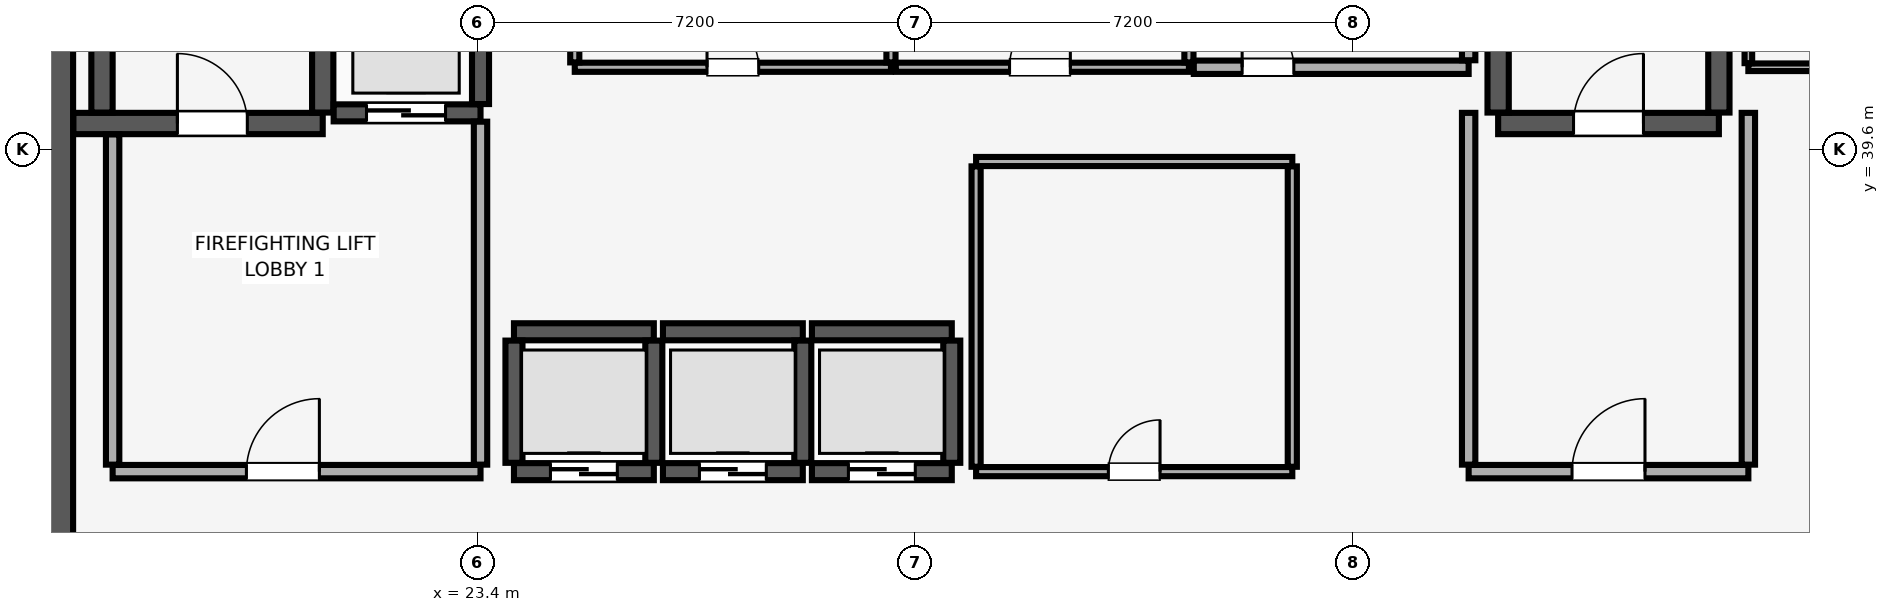
"""IFC4 building model, lengths in metres.
Left out: names, types, materials, properties, quantities, classifications, styles, units other than length and angle.
Written with IfcOpenShell. Run it as: python <this file> out.ifc"""

import sys

from ifc_helpers import new_model, si_unit, direction, frame, frame_2d, origin, place, context, subcontext, project, spatial, rectangle, extrude, element, fill, save


model = new_model("IFC4")
c1 = context("Model", 3, precision=1e-05, world=origin(), true_north=direction((0.0, 1.0)))
c2 = subcontext(c1, "Body", "Model", "MODEL_VIEW")
j1 = project(units=[si_unit("LENGTHUNIT", "METRE"), si_unit("PLANEANGLEUNIT", "RADIAN")], contexts=[c1])
p1 = place(None, origin())
s1 = spatial("IfcSite", under=j1, at=p1, CompositionType="ELEMENT")
p2 = place(p1, origin())
s2 = spatial("IfcBuilding", under=s1, at=p2, CompositionType="ELEMENT")
p3 = place(p2, frame((0.0, 0.0, 31.4)))
s3 = spatial("IfcBuildingStorey", under=s2, at=p3, CompositionType="ELEMENT", Elevation=31.4)
p4 = place(p3, frame((16.2, 29.4, 0.0), z_axis=(0.0, 0.0, 1.0), x_axis=(0.0, 1.0, 0.0)))
e1 = element("IfcWall", 1, at=p4, inside=s3, PredefinedType="SHEAR", context=c2, shape_type="SweptSolid", body=[
    extrude(rectangle(XDim=19.2, YDim=1.1, at=frame_2d((9.6, 0.0))), origin(), (0.0, 0.0, 1.0), 3.51),
])
p5 = place(p3, frame((16.755, 40.025, 0.0), z_axis=(0.0, 0.0, 1.0), x_axis=(1.0, 0.0, 0.0)))
e2 = element("IfcWall", 2, at=p5, inside=s3, PredefinedType="SHEAR", context=c2, shape_type="SweptSolid", body=[
    extrude(rectangle(XDim=4.1, YDim=0.35, at=frame_2d((2.05, 0.0))), origin(), (0.0, 0.0, 1.0), 3.51),
])
p6 = place(p5, frame((1.71, 0.0, 0.0)))
e3 = element("IfcOpeningElement", 3, at=p6, cuts=e2, PredefinedType="OPENING", context=c2, shape_type="SweptSolid", body=[
    extrude(rectangle(XDim=1.15, YDim=2.15, at=frame_2d((0.575, 1.075))), frame((0.0, 0.185, 0.0), z_axis=(0.0, -1.0, 0.0), x_axis=(1.0, 0.0, 0.0)), (0.0, 0.0, 1.0), 0.37),
])
for number, where, z_axis, x_axis in (
    (4, (17.225, 40.205, 0.0), (0.0, 0.0, 1.0), (0.0, 1.0, 0.0)),
    (5, (20.855, 40.205, 0.0), (0.0, 0.0, 1.0), (0.0, 1.0, 0.0)),
):
    element("IfcWall", number, at=place(p3, frame(where, z_axis=z_axis, x_axis=x_axis)), inside=s3, PredefinedType="SHEAR", context=c2, shape_type="SweptSolid", body=[
        extrude(rectangle(XDim=8.09, YDim=0.35, at=frame_2d((4.045, 0.0))), origin(), (0.0, 0.0, 1.0), 3.51),
    ])
p7 = place(p3, frame((40.185, 40.025, 0.0), z_axis=(0.0, 0.0, 1.0), x_axis=(1.0, 0.0, 0.0)))
e6 = element("IfcWall", 6, at=p7, inside=s3, PredefinedType="SHEAR", context=c2, shape_type="SweptSolid", body=[
    extrude(rectangle(XDim=3.63, YDim=0.35, at=frame_2d((1.815, 0.0))), origin(), (0.0, 0.0, 1.0), 3.51),
])
p8 = place(p7, frame((1.24, 0.0, 0.0)))
e7 = element("IfcOpeningElement", 7, at=p8, cuts=e6, PredefinedType="OPENING", context=c2, shape_type="SweptSolid", body=[
    extrude(rectangle(XDim=1.15, YDim=2.15, at=frame_2d((0.575, 1.075))), frame((0.0, 0.185, 0.0), z_axis=(0.0, -1.0, 0.0), x_axis=(1.0, 0.0, 0.0)), (0.0, 0.0, 1.0), 0.37),
])
for number, where, z_axis, x_axis in (
    (8, (40.185, 40.205, 0.0), (0.0, 0.0, 1.0), (0.0, 1.0, 0.0)),
    (9, (43.815, 40.205, 0.0), (0.0, 0.0, 1.0), (0.0, 1.0, 0.0)),
):
    element("IfcWall", number, at=place(p3, frame(where, z_axis=z_axis, x_axis=x_axis)), inside=s3, PredefinedType="SHEAR", context=c2, shape_type="SweptSolid", body=[
        extrude(rectangle(XDim=8.09, YDim=0.35, at=frame_2d((4.045, 0.0))), origin(), (0.0, 0.0, 1.0), 3.51),
    ])
p9 = place(p3, frame((24.0, 34.3, 0.0), z_axis=(0.0, 0.0, 1.0), x_axis=(1.0, 0.0, 0.0)))
e10 = element("IfcWall", 10, at=p9, inside=s3, PredefinedType="SHEAR", context=c2, shape_type="SweptSolid", body=[
    extrude(rectangle(XDim=2.3, YDim=0.28, at=frame_2d((1.15, 0.0))), origin(), (0.0, 0.0, 1.0), 3.51),
])
p10 = place(p9, frame((0.6, 0.0, 0.0)))
e11 = element("IfcOpeningElement", 11, at=p10, cuts=e10, PredefinedType="OPENING", context=c2, shape_type="SweptSolid", body=[
    extrude(rectangle(XDim=1.1, YDim=2.2, at=frame_2d((0.55, 1.1))), frame((0.0, 0.15, 0.0), z_axis=(0.0, -1.0, 0.0), x_axis=(1.0, 0.0, 0.0)), (0.0, 0.0, 1.0), 0.3),
])
p11 = place(p3, frame((24.0, 36.6, 0.0), z_axis=(0.0, 0.0, 1.0), x_axis=(1.0, 0.0, 0.0)))
e12 = element("IfcWall", 12, at=p11, inside=s3, PredefinedType="SHEAR", context=c2, shape_type="SweptSolid", body=[
    extrude(rectangle(XDim=2.3, YDim=0.28, at=frame_2d((1.15, 0.0))), origin(), (0.0, 0.0, 1.0), 3.51),
])
for number, where, z_axis, x_axis in (
    (13, (24.0, 34.445, 0.0), (0.0, 0.0, 1.0), (0.0, 1.0, 0.0)),
    (14, (26.3, 34.445, 0.0), (0.0, 0.0, 1.0), (0.0, 1.0, 0.0)),
):
    element("IfcWall", number, at=place(p3, frame(where, z_axis=z_axis, x_axis=x_axis)), inside=s3, PredefinedType="SHEAR", context=c2, shape_type="SweptSolid", body=[
        extrude(rectangle(XDim=2.01, YDim=0.28, at=frame_2d((1.005, 0.0))), origin(), (0.0, 0.0, 1.0), 3.51),
    ])
p12 = place(p3, frame((26.45, 34.3, 0.0), z_axis=(0.0, 0.0, 1.0), x_axis=(1.0, 0.0, 0.0)))
e15 = element("IfcWall", 15, at=p12, inside=s3, PredefinedType="SHEAR", context=c2, shape_type="SweptSolid", body=[
    extrude(rectangle(XDim=2.3, YDim=0.28, at=frame_2d((1.15, 0.0))), origin(), (0.0, 0.0, 1.0), 3.51),
])
p13 = place(p12, frame((0.6, 0.0, 0.0)))
e16 = element("IfcOpeningElement", 16, at=p13, cuts=e15, PredefinedType="OPENING", context=c2, shape_type="SweptSolid", body=[
    extrude(rectangle(XDim=1.1, YDim=2.2, at=frame_2d((0.55, 1.1))), frame((0.0, 0.15, 0.0), z_axis=(0.0, -1.0, 0.0), x_axis=(1.0, 0.0, 0.0)), (0.0, 0.0, 1.0), 0.3),
])
p14 = place(p3, frame((26.45, 36.6, 0.0), z_axis=(0.0, 0.0, 1.0), x_axis=(1.0, 0.0, 0.0)))
e17 = element("IfcWall", 17, at=p14, inside=s3, PredefinedType="SHEAR", context=c2, shape_type="SweptSolid", body=[
    extrude(rectangle(XDim=2.3, YDim=0.28, at=frame_2d((1.15, 0.0))), origin(), (0.0, 0.0, 1.0), 3.51),
])
p15 = place(p3, frame((28.75, 34.445, 0.0), z_axis=(0.0, 0.0, 1.0), x_axis=(0.0, 1.0, 0.0)))
e18 = element("IfcWall", 18, at=p15, inside=s3, PredefinedType="SHEAR", context=c2, shape_type="SweptSolid", body=[
    extrude(rectangle(XDim=2.01, YDim=0.28, at=frame_2d((1.005, 0.0))), origin(), (0.0, 0.0, 1.0), 3.51),
])
p16 = place(p3, frame((28.9, 34.3, 0.0), z_axis=(0.0, 0.0, 1.0), x_axis=(1.0, 0.0, 0.0)))
e19 = element("IfcWall", 19, at=p16, inside=s3, PredefinedType="SHEAR", context=c2, shape_type="SweptSolid", body=[
    extrude(rectangle(XDim=2.3, YDim=0.28, at=frame_2d((1.15, 0.0))), origin(), (0.0, 0.0, 1.0), 3.51),
])
p17 = place(p16, frame((0.6, 0.0, 0.0)))
e20 = element("IfcOpeningElement", 20, at=p17, cuts=e19, PredefinedType="OPENING", context=c2, shape_type="SweptSolid", body=[
    extrude(rectangle(XDim=1.1, YDim=2.2, at=frame_2d((0.55, 1.1))), frame((0.0, 0.15, 0.0), z_axis=(0.0, -1.0, 0.0), x_axis=(1.0, 0.0, 0.0)), (0.0, 0.0, 1.0), 0.3),
])
p18 = place(p3, frame((28.9, 36.6, 0.0), z_axis=(0.0, 0.0, 1.0), x_axis=(1.0, 0.0, 0.0)))
e21 = element("IfcWall", 21, at=p18, inside=s3, PredefinedType="SHEAR", context=c2, shape_type="SweptSolid", body=[
    extrude(rectangle(XDim=2.3, YDim=0.28, at=frame_2d((1.15, 0.0))), origin(), (0.0, 0.0, 1.0), 3.51),
])
p19 = place(p3, frame((31.2, 34.445, 0.0), z_axis=(0.0, 0.0, 1.0), x_axis=(0.0, 1.0, 0.0)))
e22 = element("IfcWall", 22, at=p19, inside=s3, PredefinedType="SHEAR", context=c2, shape_type="SweptSolid", body=[
    extrude(rectangle(XDim=2.01, YDim=0.28, at=frame_2d((1.005, 0.0))), origin(), (0.0, 0.0, 1.0), 3.51),
])
p20 = place(p3, frame((21.035, 40.2, 0.0), z_axis=(0.0, 0.0, 1.0), x_axis=(1.0, 0.0, 0.0)))
e23 = element("IfcWall", 23, at=p20, inside=s3, PredefinedType="SHEAR", context=c2, shape_type="SweptSolid", body=[
    extrude(rectangle(XDim=2.415, YDim=0.28, at=frame_2d((1.208, 0.0))), origin(), (0.0, 0.0, 1.0), 3.51),
])
p21 = place(p20, frame((0.54, 0.0, 0.0)))
e24 = element("IfcOpeningElement", 24, at=p21, cuts=e23, PredefinedType="OPENING", context=c2, shape_type="SweptSolid", body=[
    extrude(rectangle(XDim=1.3, YDim=2.3, at=frame_2d((0.65, 1.15))), frame((0.0, 0.15, 0.0), z_axis=(0.0, -1.0, 0.0), x_axis=(1.0, 0.0, 0.0)), (0.0, 0.0, 1.0), 0.3),
])
p22 = place(p3, frame((23.45, 40.345, 0.0), z_axis=(0.0, 0.0, 1.0), x_axis=(0.0, 1.0, 0.0)))
e25 = element("IfcWall", 25, at=p22, inside=s3, PredefinedType="SHEAR", context=c2, shape_type="SweptSolid", body=[
    extrude(rectangle(XDim=2.81, YDim=0.28, at=frame_2d((1.405, 0.0))), origin(), (0.0, 0.0, 1.0), 3.51),
])
p23 = place(p3, frame((17.4, 34.3, 0.0), z_axis=(0.0, 0.0, 1.0), x_axis=(1.0, 0.0, 0.0)))
e26 = element("IfcWall", 26, at=p23, inside=s3, PredefinedType="PARTITIONING", context=c2, shape_type="SweptSolid", body=[
    extrude(rectangle(XDim=6.05, YDim=0.22, at=frame_2d((3.025, 0.0))), origin(), (0.0, 0.0, 1.0), 3.51),
])
p24 = place(p23, frame((2.2, 0.0, 0.0)))
e27 = element("IfcOpeningElement", 27, at=p24, cuts=e26, PredefinedType="OPENING", context=c2, shape_type="SweptSolid", body=[
    extrude(rectangle(XDim=1.2, YDim=2.15, at=frame_2d((0.6, 1.075))), frame((0.0, 0.12, 0.0), z_axis=(0.0, -1.0, 0.0), x_axis=(1.0, 0.0, 0.0)), (0.0, 0.0, 1.0), 0.24),
])
p25 = place(p3, frame((17.4, 34.415, 0.0), z_axis=(0.0, 0.0, 1.0), x_axis=(0.0, 1.0, 0.0)))
e28 = element("IfcWall", 28, at=p25, inside=s3, PredefinedType="PARTITIONING", context=c2, shape_type="SweptSolid", body=[
    extrude(rectangle(XDim=5.43, YDim=0.22, at=frame_2d((2.715, 0.0))), origin(), (0.0, 0.0, 1.0), 3.51),
])
p26 = place(p3, frame((23.45, 34.415, 0.0), z_axis=(0.0, 0.0, 1.0), x_axis=(0.0, 1.0, 0.0)))
e29 = element("IfcWall", 29, at=p26, inside=s3, PredefinedType="PARTITIONING", context=c2, shape_type="SweptSolid", body=[
    extrude(rectangle(XDim=5.64, YDim=0.22, at=frame_2d((2.82, 0.0))), origin(), (0.0, 0.0, 1.0), 3.51),
])
p27 = place(p3, frame((39.7, 34.3, 0.0), z_axis=(0.0, 0.0, 1.0), x_axis=(1.0, 0.0, 0.0)))
e30 = element("IfcWall", 30, at=p27, inside=s3, PredefinedType="PARTITIONING", context=c2, shape_type="SweptSolid", body=[
    extrude(rectangle(XDim=4.6, YDim=0.22, at=frame_2d((2.3, 0.0))), origin(), (0.0, 0.0, 1.0), 3.51),
])
p28 = place(p27, frame((1.7, 0.0, 0.0)))
e31 = element("IfcOpeningElement", 31, at=p28, cuts=e30, PredefinedType="OPENING", context=c2, shape_type="SweptSolid", body=[
    extrude(rectangle(XDim=1.2, YDim=2.15, at=frame_2d((0.6, 1.075))), frame((0.0, 0.12, 0.0), z_axis=(0.0, -1.0, 0.0), x_axis=(1.0, 0.0, 0.0)), (0.0, 0.0, 1.0), 0.24),
])
for number, where, z_axis, x_axis in (
    (32, (39.7, 34.415, 0.0), (0.0, 0.0, 1.0), (0.0, 1.0, 0.0)),
    (33, (44.3, 34.415, 0.0), (0.0, 0.0, 1.0), (0.0, 1.0, 0.0)),
):
    element("IfcWall", number, at=place(p3, frame(where, z_axis=z_axis, x_axis=x_axis)), inside=s3, PredefinedType="PARTITIONING", context=c2, shape_type="SweptSolid", body=[
        extrude(rectangle(XDim=5.785, YDim=0.22, at=frame_2d((2.893, 0.0))), origin(), (0.0, 0.0, 1.0), 3.51),
    ])
p29 = place(p3, frame((31.6, 34.3, 0.0), z_axis=(0.0, 0.0, 1.0), x_axis=(1.0, 0.0, 0.0)))
e34 = element("IfcWall", 34, at=p29, inside=s3, PredefinedType="PARTITIONING", context=c2, shape_type="SweptSolid", body=[
    extrude(rectangle(XDim=5.2, YDim=0.15, at=frame_2d((2.6, 0.0))), origin(), (0.0, 0.0, 1.0), 3.51),
])
p30 = place(p29, frame((2.175, 0.0, 0.0)))
e35 = element("IfcOpeningElement", 35, at=p30, cuts=e34, PredefinedType="OPENING", context=c2, shape_type="SweptSolid", body=[
    extrude(rectangle(XDim=0.85, YDim=2.1, at=frame_2d((0.425, 1.05))), frame((0.0, 0.085, 0.0), z_axis=(0.0, -1.0, 0.0), x_axis=(1.0, 0.0, 0.0)), (0.0, 0.0, 1.0), 0.17),
])
p31 = place(p3, frame((31.6, 39.4, 0.0), z_axis=(0.0, 0.0, 1.0), x_axis=(1.0, 0.0, 0.0)))
e36 = element("IfcWall", 36, at=p31, inside=s3, PredefinedType="PARTITIONING", context=c2, shape_type="SweptSolid", body=[
    extrude(rectangle(XDim=5.2, YDim=0.15, at=frame_2d((2.6, 0.0))), origin(), (0.0, 0.0, 1.0), 3.51),
])
for number, where, z_axis, x_axis in (
    (37, (31.6, 34.38, 0.0), (0.0, 0.0, 1.0), (0.0, 1.0, 0.0)),
    (38, (36.8, 34.38, 0.0), (0.0, 0.0, 1.0), (0.0, 1.0, 0.0)),
):
    element("IfcWall", number, at=place(p3, frame(where, z_axis=z_axis, x_axis=x_axis)), inside=s3, PredefinedType="PARTITIONING", context=c2, shape_type="SweptSolid", body=[
        extrude(rectangle(XDim=4.94, YDim=0.15, at=frame_2d((2.47, 0.0))), origin(), (0.0, 0.0, 1.0), 3.51),
    ])
p32 = place(p3, frame((25.0, 40.95, 0.0), z_axis=(0.0, 0.0, 1.0), x_axis=(1.0, 0.0, 0.0)))
e39 = element("IfcWall", 39, at=p32, inside=s3, PredefinedType="PARTITIONING", context=c2, shape_type="SweptSolid", body=[
    extrude(rectangle(XDim=5.2, YDim=0.15, at=frame_2d((2.6, 0.0))), origin(), (0.0, 0.0, 1.0), 3.51),
])
p33 = place(p32, frame((2.175, 0.0, 0.0)))
e40 = element("IfcOpeningElement", 40, at=p33, cuts=e39, PredefinedType="OPENING", context=c2, shape_type="SweptSolid", body=[
    extrude(rectangle(XDim=0.85, YDim=2.1, at=frame_2d((0.425, 1.05))), frame((0.0, 0.085, 0.0), z_axis=(0.0, -1.0, 0.0), x_axis=(1.0, 0.0, 0.0)), (0.0, 0.0, 1.0), 0.17),
])
for number, where, z_axis, x_axis in (
    (41, (25.0, 41.03, 0.0), (0.0, 0.0, 1.0), (0.0, 1.0, 0.0)),
    (42, (30.2, 41.03, 0.0), (0.0, 0.0, 1.0), (0.0, 1.0, 0.0)),
):
    element("IfcWall", number, at=place(p3, frame(where, z_axis=z_axis, x_axis=x_axis)), inside=s3, PredefinedType="PARTITIONING", context=c2, shape_type="SweptSolid", body=[
        extrude(rectangle(XDim=7.82, YDim=0.15, at=frame_2d((3.91, 0.0))), origin(), (0.0, 0.0, 1.0), 3.51),
    ])
p34 = place(p3, frame((30.28, 40.95, 0.0), z_axis=(0.0, 0.0, 1.0), x_axis=(1.0, 0.0, 0.0)))
e43 = element("IfcWall", 43, at=p34, inside=s3, PredefinedType="PARTITIONING", context=c2, shape_type="SweptSolid", body=[
    extrude(rectangle(XDim=4.82, YDim=0.15, at=frame_2d((2.41, 0.0))), origin(), (0.0, 0.0, 1.0), 3.51),
])
p35 = place(p34, frame((1.87, 0.0, 0.0)))
e44 = element("IfcOpeningElement", 44, at=p35, cuts=e43, PredefinedType="OPENING", context=c2, shape_type="SweptSolid", body=[
    extrude(rectangle(XDim=1.0, YDim=2.15, at=frame_2d((0.5, 1.075))), frame((0.0, 0.085, 0.0), z_axis=(0.0, -1.0, 0.0), x_axis=(1.0, 0.0, 0.0)), (0.0, 0.0, 1.0), 0.17),
])
p36 = place(p3, frame((35.1, 41.03, 0.0), z_axis=(0.0, 0.0, 1.0), x_axis=(0.0, 1.0, 0.0)))
e45 = element("IfcWall", 45, at=p36, inside=s3, PredefinedType="PARTITIONING", context=c2, shape_type="SweptSolid", body=[
    extrude(rectangle(XDim=7.82, YDim=0.15, at=frame_2d((3.91, 0.0))), origin(), (0.0, 0.0, 1.0), 3.51),
])
p37 = place(p3, frame((35.18, 40.95, 0.0), z_axis=(0.0, 0.0, 1.0), x_axis=(1.0, 0.0, 0.0)))
e46 = element("IfcWall", 46, at=p37, inside=s3, PredefinedType="PARTITIONING", context=c2, shape_type="SweptSolid", body=[
    extrude(rectangle(XDim=4.52, YDim=0.22, at=frame_2d((2.26, 0.0))), origin(), (0.0, 0.0, 1.0), 3.51),
])
p38 = place(p37, frame((0.795, 0.0, 0.0)))
e47 = element("IfcOpeningElement", 47, at=p38, cuts=e46, PredefinedType="OPENING", context=c2, shape_type="SweptSolid", body=[
    extrude(rectangle(XDim=0.85, YDim=2.1, at=frame_2d((0.425, 1.05))), frame((0.0, 0.12, 0.0), z_axis=(0.0, -1.0, 0.0), x_axis=(1.0, 0.0, 0.0)), (0.0, 0.0, 1.0), 0.24),
])
p39 = place(p3, frame((39.7, 41.065, 0.0), z_axis=(0.0, 0.0, 1.0), x_axis=(0.0, 1.0, 0.0)))
e48 = element("IfcWall", 48, at=p39, inside=s3, PredefinedType="PARTITIONING", context=c2, shape_type="SweptSolid", body=[
    extrude(rectangle(XDim=7.785, YDim=0.22, at=frame_2d((3.893, 0.0))), origin(), (0.0, 0.0, 1.0), 3.51),
])
p40 = place(p3, frame((44.3, 40.95, 0.0), z_axis=(0.0, 0.0, 1.0), x_axis=(1.0, 0.0, 0.0)))
e49 = element("IfcWall", 49, at=p40, inside=s3, PredefinedType="PARTITIONING", context=c2, shape_type="SweptSolid", body=[
    extrude(rectangle(XDim=3.1, YDim=0.125, at=frame_2d((1.55, 0.0))), origin(), (0.0, 0.0, 1.0), 3.51),
])
p41 = place(p40, frame((1.1, 0.0, 0.0)))
e50 = element("IfcOpeningElement", 50, at=p41, cuts=e49, PredefinedType="OPENING", context=c2, shape_type="SweptSolid", body=[
    extrude(rectangle(XDim=0.9, YDim=2.1, at=frame_2d((0.45, 1.05))), frame((0.0, 0.073, 0.0), z_axis=(0.0, -1.0, 0.0), x_axis=(1.0, 0.0, 0.0)), (0.0, 0.0, 1.0), 0.145),
])
p42 = place(p3, frame((44.3, 41.018, 0.0), z_axis=(0.0, 0.0, 1.0), x_axis=(0.0, 1.0, 0.0)))
e51 = element("IfcWall", 51, at=p42, inside=s3, PredefinedType="PARTITIONING", context=c2, shape_type="SweptSolid", body=[
    extrude(rectangle(XDim=7.833, YDim=0.125, at=frame_2d((3.916, 0.0))), origin(), (0.0, 0.0, 1.0), 3.51),
])
p43 = place(p6, origin())
e52 = element("IfcDoor", 52, at=p43, inside=s3, OperationType="SINGLE_SWING_LEFT", PredefinedType="DOOR", context=c2, shape_type="SweptSolid", body=[
    extrude(rectangle(XDim=1.15, YDim=2.15, at=frame_2d((0.575, 1.075))), frame((0.0, 0.025, 0.0), z_axis=(0.0, -1.0, 0.0), x_axis=(1.0, 0.0, 0.0)), (0.0, 0.0, 1.0), 0.05),
])
fill(e3, e52)
p44 = place(p8, origin())
e53 = element("IfcDoor", 53, at=p44, inside=s3, OperationType="SINGLE_SWING_RIGHT", PredefinedType="DOOR", context=c2, shape_type="SweptSolid", body=[
    extrude(rectangle(XDim=1.15, YDim=2.15, at=frame_2d((0.575, 1.075))), frame((0.0, 0.025, 0.0), z_axis=(0.0, -1.0, 0.0), x_axis=(1.0, 0.0, 0.0)), (0.0, 0.0, 1.0), 0.05),
])
fill(e7, e53)
p45 = place(p10, origin())
e54 = element("IfcDoor", 54, at=p45, inside=s3, OperationType="DOUBLE_DOOR_SLIDING", PredefinedType="DOOR", context=c2, shape_type="SweptSolid", body=[
    extrude(rectangle(XDim=1.1, YDim=2.2, at=frame_2d((0.55, 1.1))), frame((0.0, 0.025, 0.0), z_axis=(0.0, -1.0, 0.0), x_axis=(1.0, 0.0, 0.0)), (0.0, 0.0, 1.0), 0.05),
])
fill(e11, e54)
p46 = place(p13, origin())
e55 = element("IfcDoor", 55, at=p46, inside=s3, OperationType="DOUBLE_DOOR_SLIDING", PredefinedType="DOOR", context=c2, shape_type="SweptSolid", body=[
    extrude(rectangle(XDim=1.1, YDim=2.2, at=frame_2d((0.55, 1.1))), frame((0.0, 0.025, 0.0), z_axis=(0.0, -1.0, 0.0), x_axis=(1.0, 0.0, 0.0)), (0.0, 0.0, 1.0), 0.05),
])
fill(e16, e55)
p47 = place(p17, origin())
e56 = element("IfcDoor", 56, at=p47, inside=s3, OperationType="DOUBLE_DOOR_SLIDING", PredefinedType="DOOR", context=c2, shape_type="SweptSolid", body=[
    extrude(rectangle(XDim=1.1, YDim=2.2, at=frame_2d((0.55, 1.1))), frame((0.0, 0.025, 0.0), z_axis=(0.0, -1.0, 0.0), x_axis=(1.0, 0.0, 0.0)), (0.0, 0.0, 1.0), 0.05),
])
fill(e20, e56)
p48 = place(p21, origin())
e57 = element("IfcDoor", 57, at=p48, inside=s3, OperationType="DOUBLE_DOOR_SLIDING", PredefinedType="DOOR", context=c2, shape_type="SweptSolid", body=[
    extrude(rectangle(XDim=1.3, YDim=2.3, at=frame_2d((0.65, 1.15))), frame((0.0, 0.025, 0.0), z_axis=(0.0, -1.0, 0.0), x_axis=(1.0, 0.0, 0.0)), (0.0, 0.0, 1.0), 0.05),
])
fill(e24, e57)
p49 = place(p24, origin())
e58 = element("IfcDoor", 58, at=p49, inside=s3, OperationType="SINGLE_SWING_RIGHT", PredefinedType="DOOR", context=c2, shape_type="SweptSolid", body=[
    extrude(rectangle(XDim=1.2, YDim=2.15, at=frame_2d((0.6, 1.075))), frame((0.0, 0.025, 0.0), z_axis=(0.0, -1.0, 0.0), x_axis=(1.0, 0.0, 0.0)), (0.0, 0.0, 1.0), 0.05),
])
fill(e27, e58)
p50 = place(p28, origin())
e59 = element("IfcDoor", 59, at=p50, inside=s3, OperationType="SINGLE_SWING_RIGHT", PredefinedType="DOOR", context=c2, shape_type="SweptSolid", body=[
    extrude(rectangle(XDim=1.2, YDim=2.15, at=frame_2d((0.6, 1.075))), frame((0.0, 0.025, 0.0), z_axis=(0.0, -1.0, 0.0), x_axis=(1.0, 0.0, 0.0)), (0.0, 0.0, 1.0), 0.05),
])
fill(e31, e59)
p51 = place(p30, origin())
e60 = element("IfcDoor", 60, at=p51, inside=s3, OperationType="SINGLE_SWING_RIGHT", PredefinedType="DOOR", context=c2, shape_type="SweptSolid", body=[
    extrude(rectangle(XDim=0.85, YDim=2.1, at=frame_2d((0.425, 1.05))), frame((0.0, 0.025, 0.0), z_axis=(0.0, -1.0, 0.0), x_axis=(1.0, 0.0, 0.0)), (0.0, 0.0, 1.0), 0.05),
])
fill(e35, e60)
p52 = place(p33, origin())
e61 = element("IfcDoor", 61, at=p52, inside=s3, OperationType="SINGLE_SWING_LEFT", PredefinedType="DOOR", context=c2, shape_type="SweptSolid", body=[
    extrude(rectangle(XDim=0.85, YDim=2.1, at=frame_2d((0.425, 1.05))), frame((0.0, 0.025, 0.0), z_axis=(0.0, -1.0, 0.0), x_axis=(1.0, 0.0, 0.0)), (0.0, 0.0, 1.0), 0.05),
])
fill(e40, e61)
p53 = place(p35, origin())
e62 = element("IfcDoor", 62, at=p53, inside=s3, OperationType="SINGLE_SWING_RIGHT", PredefinedType="DOOR", context=c2, shape_type="SweptSolid", body=[
    extrude(rectangle(XDim=1.0, YDim=2.15, at=frame_2d((0.5, 1.075))), frame((0.0, 0.025, 0.0), z_axis=(0.0, -1.0, 0.0), x_axis=(1.0, 0.0, 0.0)), (0.0, 0.0, 1.0), 0.05),
])
fill(e44, e62)
p54 = place(p38, origin())
e63 = element("IfcDoor", 63, at=p54, inside=s3, OperationType="SINGLE_SWING_LEFT", PredefinedType="DOOR", context=c2, shape_type="SweptSolid", body=[
    extrude(rectangle(XDim=0.85, YDim=2.1, at=frame_2d((0.425, 1.05))), frame((0.0, 0.025, 0.0), z_axis=(0.0, -1.0, 0.0), x_axis=(1.0, 0.0, 0.0)), (0.0, 0.0, 1.0), 0.05),
])
fill(e47, e63)
save(model, sys.argv[1])
